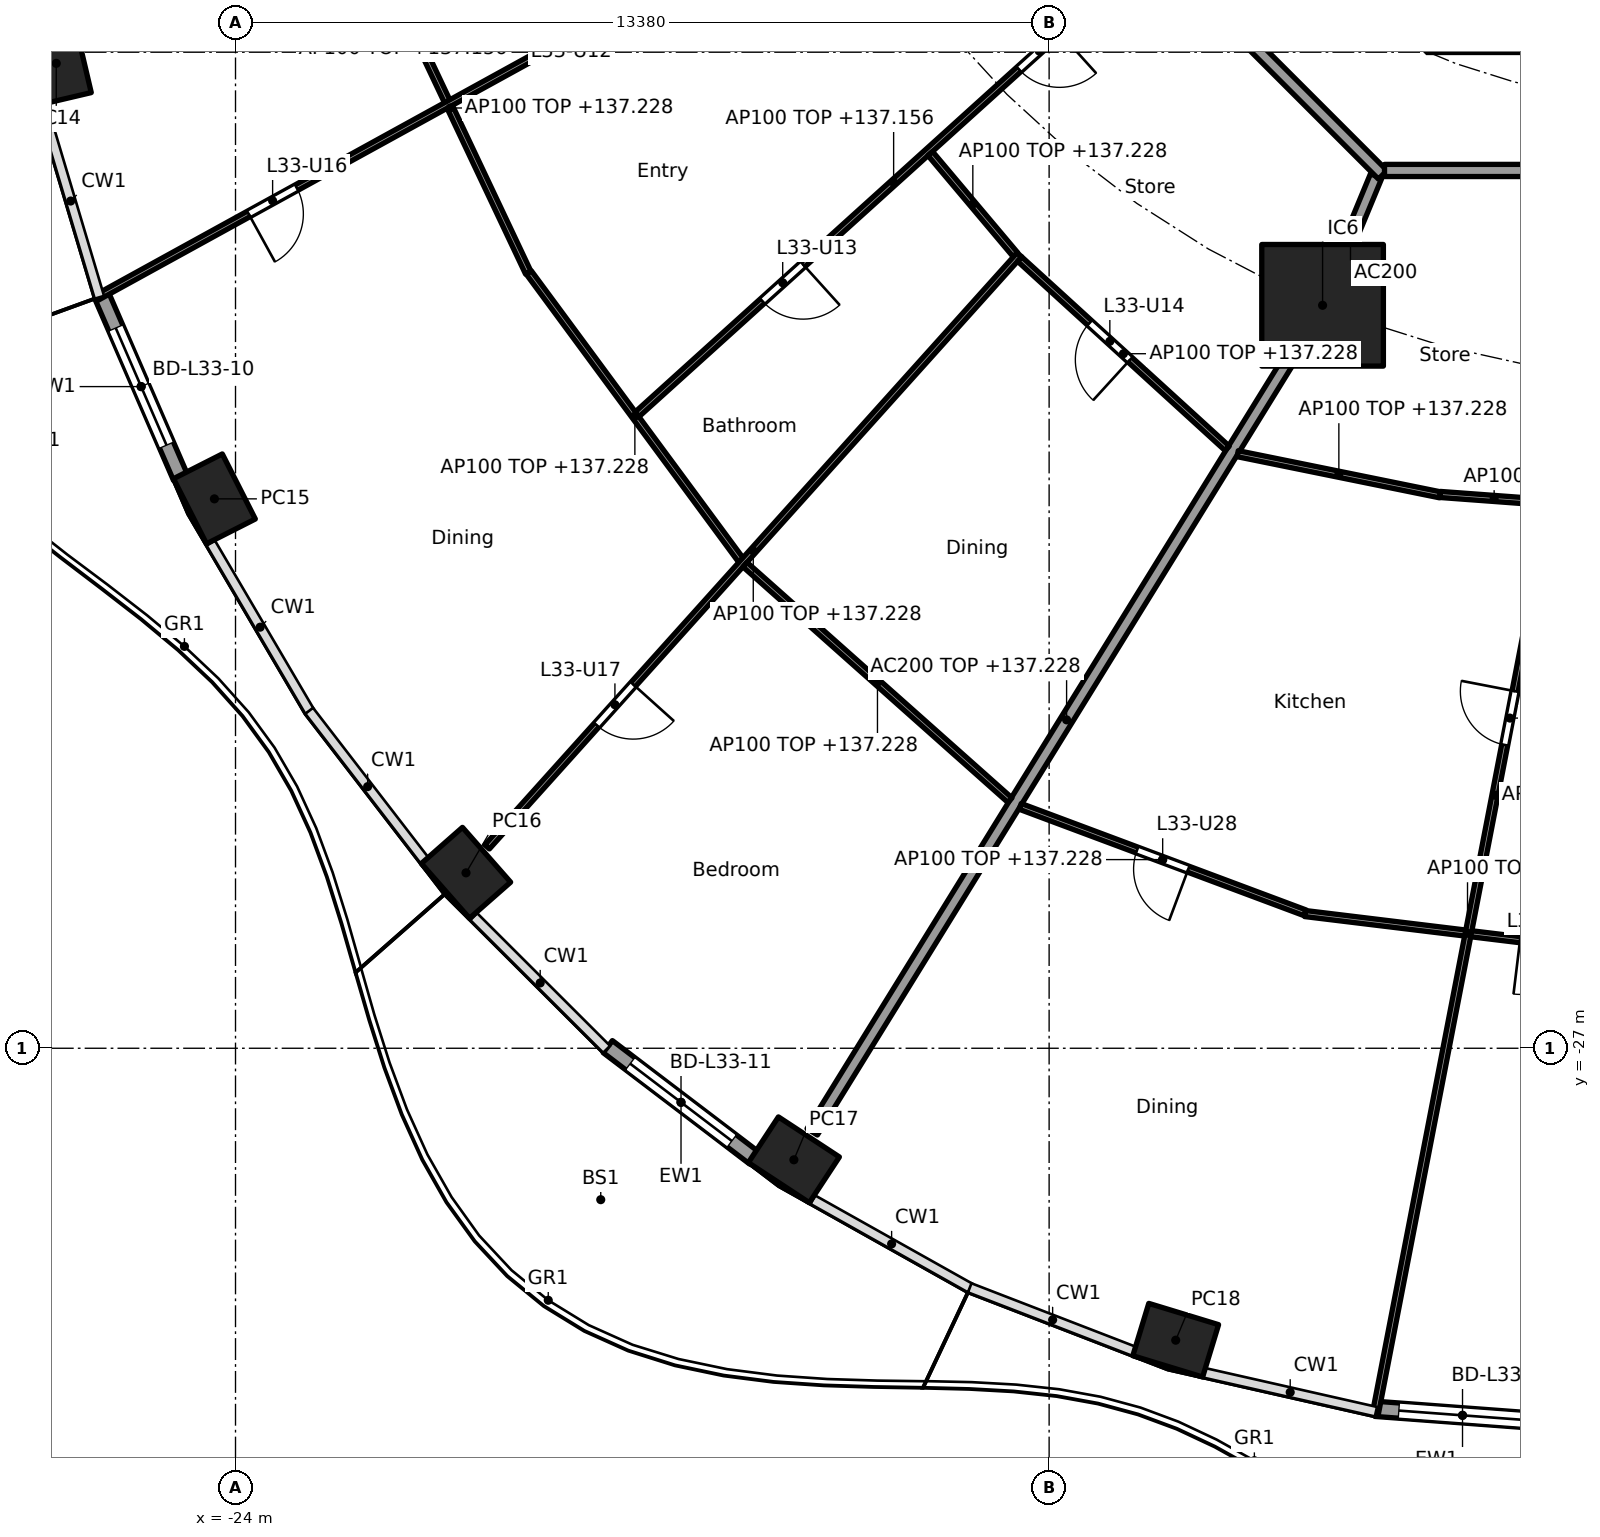
"""IFC4 building model, lengths in metres.
Left out: names, types, materials, properties, quantities, classifications, styles, units other than length and angle.
Written with IfcOpenShell. Run it as: python <this file> out.ifc"""

import sys

from ifc_helpers import new_model, si_unit, direction, frame, frame_2d, origin, origin_2d, place, context, subcontext, project, spatial, rectangle, hollow_rectangle, extrude, element, fill, save


model = new_model("IFC4")
c1 = context("Model", 3, precision=1e-05, world=origin(), true_north=direction((0.0, 1.0)))
c2 = subcontext(c1, "Body", "Model", "MODEL_VIEW")
j1 = project(units=[si_unit("LENGTHUNIT", "METRE"), si_unit("PLANEANGLEUNIT", "RADIAN")], contexts=[c1])
p1 = place(None, origin())
s1 = spatial("IfcSite", under=j1, at=p1, CompositionType="ELEMENT")
p2 = place(p1, origin())
s2 = spatial("IfcBuilding", under=s1, at=p2, CompositionType="ELEMENT")
p3 = place(p2, frame((0.0, 0.0, 134.4)))
s3 = spatial("IfcBuildingStorey", under=s2, at=p3, CompositionType="ELEMENT", Elevation=134.4)
for number, where, z_axis, x_axis in (
    (1, (-26.948, -10.803, 0.0), (0.0, 0.0, 1.0), (0.229, -0.973, 0.0)),
    (2, (-24.347, -17.965, 0.0), (0.0, 0.0, 1.0), (0.452, -0.892, 0.0)),
    (3, (-20.209, -24.115, 0.0), (0.0, 0.0, 1.0), (0.66, -0.751, 0.0)),
    (4, (-14.817, -28.834, 0.0), (0.0, 0.0, 1.0), (0.836, -0.549, 0.0)),
    (5, (-8.538, -31.801, 0.0), (0.0, 0.0, 1.0), (0.957, -0.292, 0.0)),
):
    element("IfcColumn", number, at=place(p3, frame(where, z_axis=z_axis, x_axis=x_axis)), inside=s3, PredefinedType="COLUMN", context=c2, shape_type="SweptSolid", body=[
        extrude(hollow_rectangle(XDim=1.2, YDim=0.9, WallThickness=0.04, at=origin_2d()), origin(), (0.0, 0.0, 1.0), 3.7),
    ])
p4 = place(p3, frame((-6.123, -14.782, 0.0), z_axis=(0.0, 0.0, 1.0), x_axis=(1.0, 0.0, 0.0)))
e6 = element("IfcColumn", 6, at=p4, inside=s3, PredefinedType="COLUMN", context=c2, shape_type="SweptSolid", body=[
    extrude(rectangle(XDim=2.0, YDim=2.0, at=origin_2d()), origin(), (0.0, 0.0, 1.0), 3.7),
])
p5 = place(p3, frame((-24.904, -17.615, 0.0), z_axis=(0.0, 0.0, 1.0), x_axis=(-0.397638954585, 0.917541967321, 0.0)))
e7 = element("IfcWall", 7, at=p5, inside=s3, PredefinedType="SOLIDWALL", context=c2, shape_type="SweptSolid", body=[
    extrude(rectangle(XDim=3.261, YDim=0.25, at=frame_2d((1.63, 0.0))), origin(), (0.0, 0.0, 1.0), 3.44),
])
p6 = place(p5, frame((0.58, 0.0, 0.0)))
e8 = element("IfcOpeningElement", 8, at=p6, cuts=e7, PredefinedType="OPENING", context=c2, shape_type="SweptSolid", body=[
    extrude(rectangle(XDim=2.1, YDim=2.4, at=frame_2d((1.05, 1.2))), frame((0.0, 0.135, 0.0), z_axis=(0.0, -1.0, 0.0), x_axis=(1.0, 0.0, 0.0)), (0.0, 0.0, 1.0), 0.27),
])
p7 = place(p3, frame((-15.469, -28.805, 0.0), z_axis=(0.0, 0.0, 1.0), x_axis=(-0.796022231079, 0.605267385233, 0.0)))
e9 = element("IfcWall", 9, at=p7, inside=s3, PredefinedType="SOLIDWALL", context=c2, shape_type="SweptSolid", body=[
    extrude(rectangle(XDim=3.026, YDim=0.25, at=frame_2d((1.513, 0.0))), origin(), (0.0, 0.0, 1.0), 3.44),
])
p8 = place(p7, frame((0.463, 0.0, 0.0)))
e10 = element("IfcOpeningElement", 10, at=p8, cuts=e9, PredefinedType="OPENING", context=c2, shape_type="SweptSolid", body=[
    extrude(rectangle(XDim=2.1, YDim=2.4, at=frame_2d((1.05, 1.2))), frame((0.0, 0.135, 0.0), z_axis=(0.0, -1.0, 0.0), x_axis=(1.0, 0.0, 0.0)), (0.0, 0.0, 1.0), 0.27),
])
p9 = place(p3, frame((-2.389, -33.143, 0.0), z_axis=(0.0, 0.0, 1.0), x_axis=(-0.997231697044, 0.074356858535, 0.0)))
e11 = element("IfcWall", 11, at=p9, inside=s3, PredefinedType="SOLIDWALL", context=c2, shape_type="SweptSolid", body=[
    extrude(rectangle(XDim=2.873, YDim=0.25, at=frame_2d((1.437, 0.0))), origin(), (0.0, 0.0, 1.0), 3.44),
])
p10 = place(p9, frame((0.386, 0.0, 0.0)))
e12 = element("IfcOpeningElement", 12, at=p10, cuts=e11, PredefinedType="OPENING", context=c2, shape_type="SweptSolid", body=[
    extrude(rectangle(XDim=2.1, YDim=2.4, at=frame_2d((1.05, 1.2))), frame((0.0, 0.135, 0.0), z_axis=(0.0, -1.0, 0.0), x_axis=(1.0, 0.0, 0.0)), (0.0, 0.0, 1.0), 0.27),
])
p11 = place(p3, frame((-5.243, -12.657, 0.0), z_axis=(0.0, 0.0, 1.0), x_axis=(-0.382818775282, -0.923823460025, 0.0)))
e13 = element("IfcWall", 13, at=p11, inside=s3, PredefinedType="PARTITIONING", context=c2, shape_type="SweptSolid", body=[
    extrude(rectangle(XDim=2.201, YDim=0.2, at=frame_2d((1.101, 0.0))), origin(), (0.0, 0.0, 1.0), 3.44),
])
p12 = place(p3, frame((-6.149, -14.825, 0.0), z_axis=(0.0, 0.0, 1.0), x_axis=(-0.525406383516, -0.85085141603, 0.0)))
e14 = element("IfcWall", 14, at=p12, inside=s3, PredefinedType="PARTITIONING", context=c2, shape_type="SweptSolid", body=[
    extrude(rectangle(XDim=15.925, YDim=0.2, at=frame_2d((7.962, 0.0))), origin(), (0.0, 0.0, 1.0), 2.828),
])
p13 = place(p3, frame((-12.635, -5.134, 0.0), z_axis=(0.0, 0.0, 1.0), x_axis=(0.707106781187, -0.707106781187, 0.0)))
e15 = element("IfcWall", 15, at=p13, inside=s3, PredefinedType="PARTITIONING", context=c2, shape_type="SweptSolid", body=[
    extrude(rectangle(XDim=10.609, YDim=0.2, at=frame_2d((5.305, 0.0))), origin(), (0.0, 0.0, 1.0), 3.44),
])
p14 = place(p13, frame((3.07, 0.0, 0.0)))
e16 = element("IfcOpeningElement", 16, at=p14, cuts=e15, PredefinedType="OPENING", context=c2, shape_type="SweptSolid", body=[
    extrude(rectangle(XDim=1.0, YDim=2.1, at=frame_2d((0.5, 1.05))), frame((0.0, 0.11, 0.0), z_axis=(0.0, -1.0, 0.0), x_axis=(1.0, 0.0, 0.0)), (0.0, 0.0, 1.0), 0.22),
])
p15 = place(p3, frame((-5.104, -12.565, 0.0), z_axis=(0.0, 0.0, 1.0), x_axis=(1.0, 0.0, 0.0)))
e17 = element("IfcWall", 17, at=p15, inside=s3, PredefinedType="PARTITIONING", context=c2, shape_type="SweptSolid", body=[
    extrude(rectangle(XDim=10.409, YDim=0.2, at=frame_2d((5.205, 0.0))), origin(), (0.0, 0.0, 1.0), 3.44),
])
p16 = place(p15, frame((4.604, 0.0, 0.0)))
e18 = element("IfcOpeningElement", 18, at=p16, cuts=e17, PredefinedType="OPENING", context=c2, shape_type="SweptSolid", body=[
    extrude(rectangle(XDim=1.0, YDim=2.1, at=frame_2d((0.5, 1.05))), frame((0.0, 0.11, 0.0), z_axis=(0.0, -1.0, 0.0), x_axis=(1.0, 0.0, 0.0)), (0.0, 0.0, 1.0), 0.22),
])
p17 = place(p3, frame((-21.75, -8.826, 0.0), z_axis=(0.0, 0.0, 1.0), x_axis=(0.427736419988, -0.903903509793, 0.0)))
e19 = element("IfcWall", 19, at=p17, inside=s3, PredefinedType="PARTITIONING", context=c2, shape_type="SweptSolid", body=[
    extrude(rectangle(XDim=5.999, YDim=0.1, at=frame_2d((3.0, 0.0))), origin(), (0.0, 0.0, 1.0), 2.828),
])
p18 = place(p3, frame((-11.426, -6.479, 0.0), z_axis=(0.0, 0.0, 1.0), x_axis=(-0.876110392495, -0.482110547657, 0.0)))
e20 = element("IfcWall", 20, at=p18, inside=s3, PredefinedType="PARTITIONING", context=c2, shape_type="SweptSolid", body=[
    extrude(rectangle(XDim=16.955, YDim=0.1, at=frame_2d((8.478, 0.0))), origin(), (0.0, 0.0, 1.0), 2.756),
])
p19 = place(p18, frame((0.35, 0.0, 0.0)))
e21 = element("IfcOpeningElement", 21, at=p19, cuts=e20, PredefinedType="OPENING", context=c2, shape_type="SweptSolid", body=[
    extrude(rectangle(XDim=0.9, YDim=2.1, at=frame_2d((0.45, 1.05))), frame((0.0, 0.06, 0.0), z_axis=(0.0, -1.0, 0.0), x_axis=(1.0, 0.0, 0.0)), (0.0, 0.0, 1.0), 0.12),
])
p20 = place(p18, frame((6.957, 0.0, 0.0)))
e22 = element("IfcOpeningElement", 22, at=p20, cuts=e20, PredefinedType="OPENING", context=c2, shape_type="SweptSolid", body=[
    extrude(rectangle(XDim=0.9, YDim=2.1, at=frame_2d((0.45, 1.05))), frame((0.0, 0.06, 0.0), z_axis=(0.0, -1.0, 0.0), x_axis=(1.0, 0.0, 0.0)), (0.0, 0.0, 1.0), 0.12),
])
p21 = place(p18, frame((13.206, 0.0, 0.0)))
e23 = element("IfcOpeningElement", 23, at=p21, cuts=e20, PredefinedType="OPENING", context=c2, shape_type="SweptSolid", body=[
    extrude(rectangle(XDim=0.9, YDim=2.1, at=frame_2d((0.45, 1.05))), frame((0.0, 0.06, 0.0), z_axis=(0.0, -1.0, 0.0), x_axis=(1.0, 0.0, 0.0)), (0.0, 0.0, 1.0), 0.12),
])
p22 = place(p3, frame((-19.176, -14.244, 0.0), z_axis=(0.0, 0.0, 1.0), x_axis=(0.593532053206, -0.80481035146, 0.0)))
e24 = element("IfcWall", 24, at=p22, inside=s3, PredefinedType="PARTITIONING", context=c2, shape_type="SweptSolid", body=[
    extrude(rectangle(XDim=5.876, YDim=0.1, at=frame_2d((2.938, 0.0))), origin(), (0.0, 0.0, 1.0), 2.828),
])
p23 = place(p3, frame((-8.959, -8.952, 0.0), z_axis=(0.0, 0.0, 1.0), x_axis=(-0.741982736283, -0.670418987692, 0.0)))
e25 = element("IfcWall", 25, at=p23, inside=s3, PredefinedType="PARTITIONING", context=c2, shape_type="SweptSolid", body=[
    extrude(rectangle(XDim=11.371, YDim=0.1, at=frame_2d((5.685, 0.0))), origin(), (0.0, 0.0, 1.0), 2.756),
])
p24 = place(p23, frame((2.009, 0.0, 0.0)))
e26 = element("IfcOpeningElement", 26, at=p24, cuts=e25, PredefinedType="OPENING", context=c2, shape_type="SweptSolid", body=[
    extrude(rectangle(XDim=0.9, YDim=2.1, at=frame_2d((0.45, 1.05))), frame((0.0, 0.06, 0.0), z_axis=(0.0, -1.0, 0.0), x_axis=(1.0, 0.0, 0.0)), (0.0, 0.0, 1.0), 0.12),
])
p25 = place(p23, frame((7.694, 0.0, 0.0)))
e27 = element("IfcOpeningElement", 27, at=p25, cuts=e25, PredefinedType="OPENING", context=c2, shape_type="SweptSolid", body=[
    extrude(rectangle(XDim=0.9, YDim=2.1, at=frame_2d((0.45, 1.05))), frame((0.0, 0.06, 0.0), z_axis=(0.0, -1.0, 0.0), x_axis=(1.0, 0.0, 0.0)), (0.0, 0.0, 1.0), 0.12),
])
p26 = place(p3, frame((-12.575, -12.286, 0.0), z_axis=(0.0, 0.0, 1.0), x_axis=(0.644052758448, -0.764981074495, 0.0)))
e28 = element("IfcWall", 28, at=p26, inside=s3, PredefinedType="PARTITIONING", context=c2, shape_type="SweptSolid", body=[
    extrude(rectangle(XDim=2.174, YDim=0.1, at=frame_2d((1.087, 0.0))), origin(), (0.0, 0.0, 1.0), 2.828),
])
p27 = place(p3, frame((-11.109, -13.951, 0.0), z_axis=(0.0, 0.0, 1.0), x_axis=(-0.668488676691, -0.743722319913, 0.0)))
e29 = element("IfcWall", 29, at=p27, inside=s3, PredefinedType="PARTITIONING", context=c2, shape_type="SweptSolid", body=[
    extrude(rectangle(XDim=13.094, YDim=0.1, at=frame_2d((6.547, 0.0))), origin(), (0.0, 0.0, 1.0), 2.828),
])
p28 = place(p27, frame((9.5, 0.0, 0.0)))
e30 = element("IfcOpeningElement", 30, at=p28, cuts=e29, PredefinedType="OPENING", context=c2, shape_type="SweptSolid", body=[
    extrude(rectangle(XDim=0.9, YDim=2.1, at=frame_2d((0.45, 1.05))), frame((0.0, 0.06, 0.0), z_axis=(0.0, -1.0, 0.0), x_axis=(1.0, 0.0, 0.0)), (0.0, 0.0, 1.0), 0.12),
])
p29 = place(p3, frame((-11.105, -14.021, 0.0), z_axis=(0.0, 0.0, 1.0), x_axis=(0.738880014758, -0.673837015747, 0.0)))
e31 = element("IfcWall", 31, at=p29, inside=s3, PredefinedType="PARTITIONING", context=c2, shape_type="SweptSolid", body=[
    extrude(rectangle(XDim=4.621, YDim=0.1, at=frame_2d((2.31, 0.0))), origin(), (0.0, 0.0, 1.0), 2.828),
])
p30 = place(p29, frame((1.558, 0.0, 0.0)))
e32 = element("IfcOpeningElement", 32, at=p30, cuts=e31, PredefinedType="OPENING", context=c2, shape_type="SweptSolid", body=[
    extrude(rectangle(XDim=0.9, YDim=2.1, at=frame_2d((0.45, 1.05))), frame((0.0, 0.06, 0.0), z_axis=(0.0, -1.0, 0.0), x_axis=(1.0, 0.0, 0.0)), (0.0, 0.0, 1.0), 0.12),
])
p31 = place(p3, frame((-15.622, -19.046, 0.0), z_axis=(0.0, 0.0, 1.0), x_axis=(0.747342322463, -0.664439201925, 0.0)))
e33 = element("IfcWall", 33, at=p31, inside=s3, PredefinedType="PARTITIONING", context=c2, shape_type="SweptSolid", body=[
    extrude(rectangle(XDim=5.831, YDim=0.1, at=frame_2d((2.916, 0.0))), origin(), (0.0, 0.0, 1.0), 2.828),
])
p32 = place(p3, frame((-7.52, -17.222, 0.0), z_axis=(0.0, 0.0, 1.0), x_axis=(0.979964966792, -0.199169937141, 0.0)))
e34 = element("IfcWall", 34, at=p32, inside=s3, PredefinedType="PARTITIONING", context=c2, shape_type="SweptSolid", body=[
    extrude(rectangle(XDim=3.397, YDim=0.1, at=frame_2d((1.698, 0.0))), origin(), (0.0, 0.0, 1.0), 2.828),
])
p33 = place(p3, frame((-11.096, -23.022, 0.0), z_axis=(0.0, 0.0, 1.0), x_axis=(0.936725688471, -0.350064257758, 0.0)))
e35 = element("IfcWall", 35, at=p33, inside=s3, PredefinedType="PARTITIONING", context=c2, shape_type="SweptSolid", body=[
    extrude(rectangle(XDim=5.003, YDim=0.1, at=frame_2d((2.501, 0.0))), origin(), (0.0, 0.0, 1.0), 2.828),
])
p34 = place(p33, frame((2.051, 0.0, 0.0)))
e36 = element("IfcOpeningElement", 36, at=p34, cuts=e35, PredefinedType="OPENING", context=c2, shape_type="SweptSolid", body=[
    extrude(rectangle(XDim=0.9, YDim=2.1, at=frame_2d((0.45, 1.05))), frame((0.0, 0.06, 0.0), z_axis=(0.0, -1.0, 0.0), x_axis=(1.0, 0.0, 0.0)), (0.0, 0.0, 1.0), 0.12),
])
p35 = place(p3, frame((-4.19, -17.893, 0.0), z_axis=(0.0, 0.0, 1.0), x_axis=(0.99727037024, -0.07383636395, 0.0)))
e37 = element("IfcWall", 37, at=p35, inside=s3, PredefinedType="PARTITIONING", context=c2, shape_type="SweptSolid", body=[
    extrude(rectangle(XDim=1.782, YDim=0.1, at=frame_2d((0.891, 0.0))), origin(), (0.0, 0.0, 1.0), 3.44),
])
p36 = place(p3, frame((-6.413, -24.784, 0.0), z_axis=(0.0, 0.0, 1.0), x_axis=(0.99268660964, -0.120719903255, 0.0)))
e38 = element("IfcWall", 38, at=p36, inside=s3, PredefinedType="PARTITIONING", context=c2, shape_type="SweptSolid", body=[
    extrude(rectangle(XDim=5.385, YDim=0.1, at=frame_2d((2.693, 0.0))), origin(), (0.0, 0.0, 1.0), 2.828),
])
p37 = place(p36, frame((3.564, 0.0, 0.0)))
e39 = element("IfcOpeningElement", 39, at=p37, cuts=e38, PredefinedType="OPENING", context=c2, shape_type="SweptSolid", body=[
    extrude(rectangle(XDim=0.9, YDim=2.1, at=frame_2d((0.45, 1.05))), frame((0.0, 0.06, 0.0), z_axis=(0.0, -1.0, 0.0), x_axis=(1.0, 0.0, 0.0)), (0.0, 0.0, 1.0), 0.12),
])
p38 = place(p3, frame((-1.32, -12.663, 0.0), z_axis=(0.0, 0.0, 1.0), x_axis=(-0.189865535907, -0.98181010296, 0.0)))
e40 = element("IfcWall", 40, at=p38, inside=s3, PredefinedType="PARTITIONING", context=c2, shape_type="SweptSolid", body=[
    extrude(rectangle(XDim=20.729, YDim=0.1, at=frame_2d((10.365, 0.0))), origin(), (0.0, 0.0, 1.0), 2.756),
])
p39 = place(p38, frame((2.283, 0.0, 0.0)))
e41 = element("IfcOpeningElement", 41, at=p39, cuts=e40, PredefinedType="OPENING", context=c2, shape_type="SweptSolid", body=[
    extrude(rectangle(XDim=0.9, YDim=2.1, at=frame_2d((0.45, 1.05))), frame((0.0, 0.06, 0.0), z_axis=(0.0, -1.0, 0.0), x_axis=(1.0, 0.0, 0.0)), (0.0, 0.0, 1.0), 0.12),
])
p40 = place(p38, frame((8.622, 0.0, 0.0)))
e42 = element("IfcOpeningElement", 42, at=p40, cuts=e40, PredefinedType="OPENING", context=c2, shape_type="SweptSolid", body=[
    extrude(rectangle(XDim=0.9, YDim=2.1, at=frame_2d((0.45, 1.05))), frame((0.0, 0.06, 0.0), z_axis=(0.0, -1.0, 0.0), x_axis=(1.0, 0.0, 0.0)), (0.0, 0.0, 1.0), 0.12),
])
p41 = place(p6, origin())
e43 = element("IfcDoor", 43, at=p41, inside=s3, OperationType="SLIDING_TO_LEFT", PredefinedType="DOOR", context=c2, shape_type="SweptSolid", body=[
    extrude(rectangle(XDim=2.1, YDim=2.4, at=frame_2d((1.05, 1.2))), frame((0.0, 0.025, 0.0), z_axis=(0.0, -1.0, 0.0), x_axis=(1.0, 0.0, 0.0)), (0.0, 0.0, 1.0), 0.05),
])
fill(e8, e43)
p42 = place(p8, origin())
e44 = element("IfcDoor", 44, at=p42, inside=s3, OperationType="SLIDING_TO_LEFT", PredefinedType="DOOR", context=c2, shape_type="SweptSolid", body=[
    extrude(rectangle(XDim=2.1, YDim=2.4, at=frame_2d((1.05, 1.2))), frame((0.0, 0.025, 0.0), z_axis=(0.0, -1.0, 0.0), x_axis=(1.0, 0.0, 0.0)), (0.0, 0.0, 1.0), 0.05),
])
fill(e10, e44)
p43 = place(p10, origin())
e45 = element("IfcDoor", 45, at=p43, inside=s3, OperationType="SLIDING_TO_LEFT", PredefinedType="DOOR", context=c2, shape_type="SweptSolid", body=[
    extrude(rectangle(XDim=2.1, YDim=2.4, at=frame_2d((1.05, 1.2))), frame((0.0, 0.025, 0.0), z_axis=(0.0, -1.0, 0.0), x_axis=(1.0, 0.0, 0.0)), (0.0, 0.0, 1.0), 0.05),
])
fill(e12, e45)
p44 = place(p24, origin())
e46 = element("IfcDoor", 46, at=p44, inside=s3, OperationType="SINGLE_SWING_LEFT", PredefinedType="DOOR", context=c2, shape_type="SweptSolid", body=[
    extrude(rectangle(XDim=0.9, YDim=2.1, at=frame_2d((0.45, 1.05))), frame((0.0, 0.025, 0.0), z_axis=(0.0, -1.0, 0.0), x_axis=(1.0, 0.0, 0.0)), (0.0, 0.0, 1.0), 0.05),
])
fill(e26, e46)
p45 = place(p25, origin())
e47 = element("IfcDoor", 47, at=p45, inside=s3, OperationType="SINGLE_SWING_LEFT", PredefinedType="DOOR", context=c2, shape_type="SweptSolid", body=[
    extrude(rectangle(XDim=0.9, YDim=2.1, at=frame_2d((0.45, 1.05))), frame((0.0, 0.025, 0.0), z_axis=(0.0, -1.0, 0.0), x_axis=(1.0, 0.0, 0.0)), (0.0, 0.0, 1.0), 0.05),
])
fill(e27, e47)
p46 = place(p30, frame((0.9, 0.0, 0.0), x_axis=(-1.0, 0.0, 0.0)))
e48 = element("IfcDoor", 48, at=p46, inside=s3, OperationType="SINGLE_SWING_LEFT", PredefinedType="DOOR", context=c2, shape_type="SweptSolid", body=[
    extrude(rectangle(XDim=0.9, YDim=2.1, at=frame_2d((0.45, 1.05))), frame((0.0, 0.025, 0.0), z_axis=(0.0, -1.0, 0.0), x_axis=(1.0, 0.0, 0.0)), (0.0, 0.0, 1.0), 0.05),
])
fill(e32, e48)
p47 = place(p21, origin())
e49 = element("IfcDoor", 49, at=p47, inside=s3, OperationType="SINGLE_SWING_RIGHT", PredefinedType="DOOR", context=c2, shape_type="SweptSolid", body=[
    extrude(rectangle(XDim=0.9, YDim=2.1, at=frame_2d((0.45, 1.05))), frame((0.0, 0.025, 0.0), z_axis=(0.0, -1.0, 0.0), x_axis=(1.0, 0.0, 0.0)), (0.0, 0.0, 1.0), 0.05),
])
fill(e23, e49)
p48 = place(p28, origin())
e50 = element("IfcDoor", 50, at=p48, inside=s3, OperationType="SINGLE_SWING_LEFT", PredefinedType="DOOR", context=c2, shape_type="SweptSolid", body=[
    extrude(rectangle(XDim=0.9, YDim=2.1, at=frame_2d((0.45, 1.05))), frame((0.0, 0.025, 0.0), z_axis=(0.0, -1.0, 0.0), x_axis=(1.0, 0.0, 0.0)), (0.0, 0.0, 1.0), 0.05),
])
fill(e30, e50)
p49 = place(p40, frame((0.9, 0.0, 0.0), x_axis=(-1.0, 0.0, 0.0)))
e51 = element("IfcDoor", 51, at=p49, inside=s3, OperationType="SINGLE_SWING_RIGHT", PredefinedType="DOOR", context=c2, shape_type="SweptSolid", body=[
    extrude(rectangle(XDim=0.9, YDim=2.1, at=frame_2d((0.45, 1.05))), frame((0.0, 0.025, 0.0), z_axis=(0.0, -1.0, 0.0), x_axis=(1.0, 0.0, 0.0)), (0.0, 0.0, 1.0), 0.05),
])
fill(e42, e51)
p50 = place(p34, frame((0.9, 0.0, 0.0), x_axis=(-1.0, 0.0, 0.0)))
e52 = element("IfcDoor", 52, at=p50, inside=s3, OperationType="SINGLE_SWING_LEFT", PredefinedType="DOOR", context=c2, shape_type="SweptSolid", body=[
    extrude(rectangle(XDim=0.9, YDim=2.1, at=frame_2d((0.45, 1.05))), frame((0.0, 0.025, 0.0), z_axis=(0.0, -1.0, 0.0), x_axis=(1.0, 0.0, 0.0)), (0.0, 0.0, 1.0), 0.05),
])
fill(e36, e52)
p51 = place(p37, frame((0.9, 0.0, 0.0), x_axis=(-1.0, 0.0, 0.0)))
e53 = element("IfcDoor", 53, at=p51, inside=s3, OperationType="SINGLE_SWING_RIGHT", PredefinedType="DOOR", context=c2, shape_type="SweptSolid", body=[
    extrude(rectangle(XDim=0.9, YDim=2.1, at=frame_2d((0.45, 1.05))), frame((0.0, 0.025, 0.0), z_axis=(0.0, -1.0, 0.0), x_axis=(1.0, 0.0, 0.0)), (0.0, 0.0, 1.0), 0.05),
])
fill(e39, e53)
save(model, sys.argv[1])
